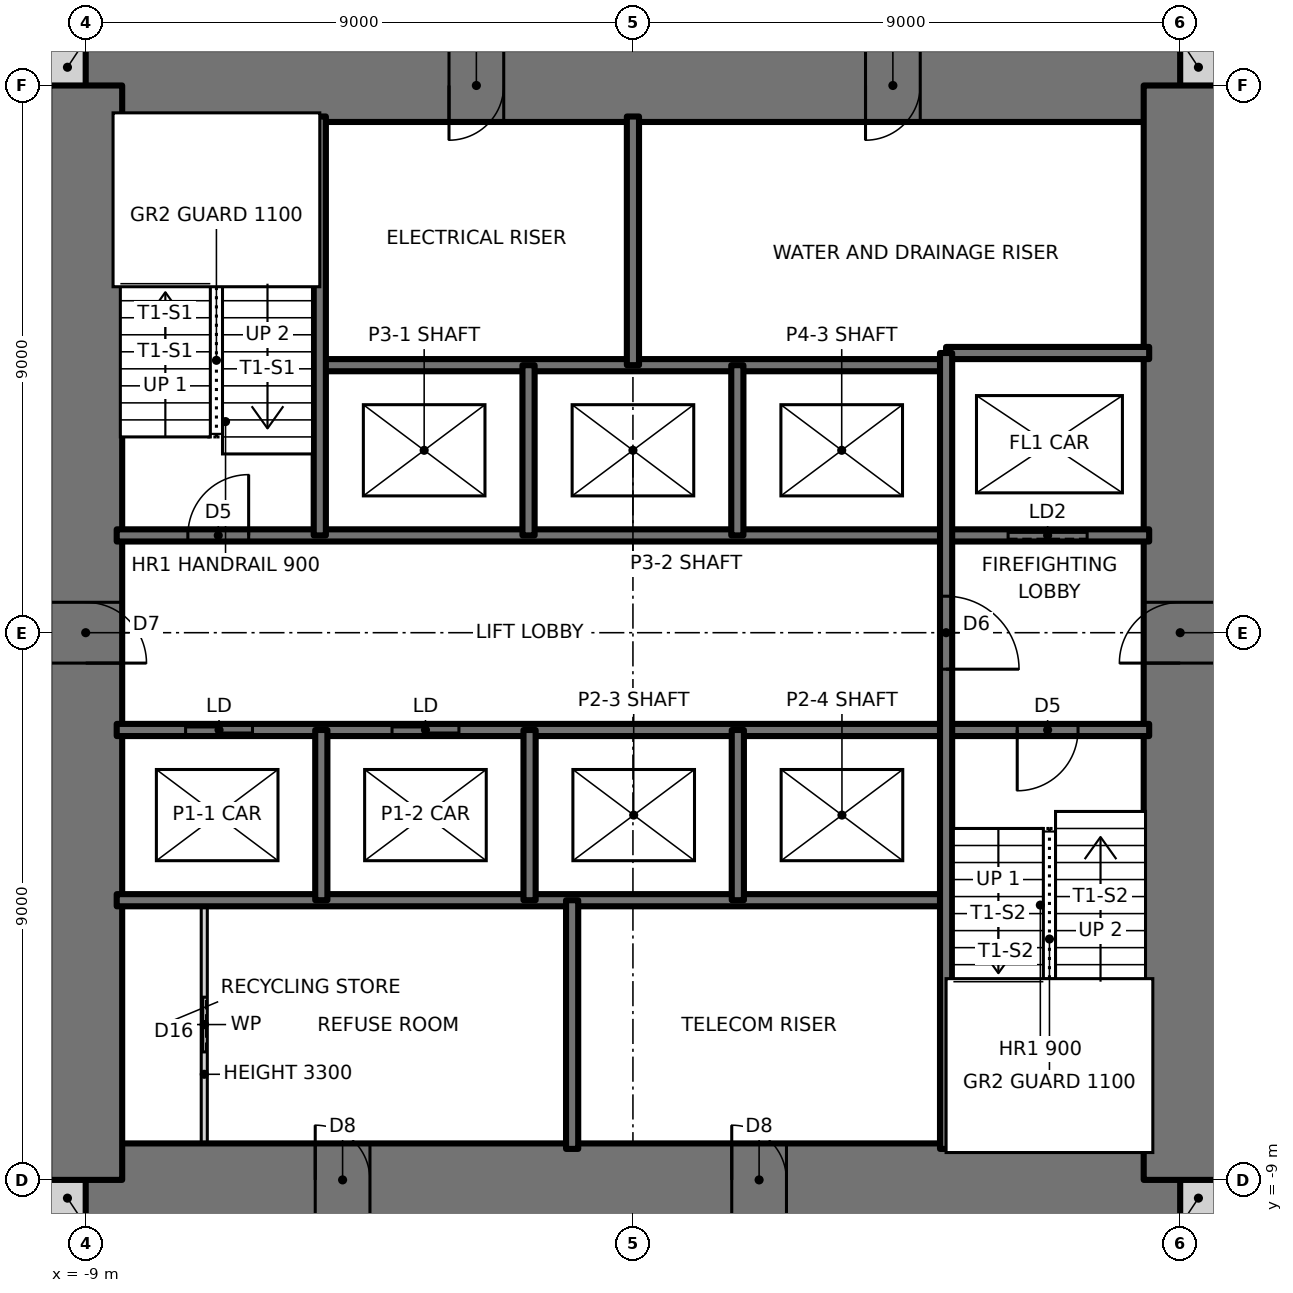
"""IFC4 building model, lengths in metres.
Left out: names, types, materials, properties, quantities, classifications, styles, units other than length and angle.
Written with IfcOpenShell. Run it as: python <this file> out.ifc"""

import sys

from ifc_helpers import new_model, si_unit, direction, frame, frame_2d, origin, place, context, subcontext, project, spatial, rectangle, extrude, element, fill, save


model = new_model("IFC4")
c1 = context("Model", 3, precision=1e-05, world=origin(), true_north=direction((0.0, 1.0)))
c2 = subcontext(c1, "Body", "Model", "MODEL_VIEW")
j1 = project(units=[si_unit("LENGTHUNIT", "METRE"), si_unit("PLANEANGLEUNIT", "RADIAN")], contexts=[c1])
p1 = place(None, origin())
s1 = spatial("IfcSite", under=j1, at=p1, CompositionType="ELEMENT")
p2 = place(p1, origin())
s2 = spatial("IfcBuilding", under=s1, at=p2, CompositionType="ELEMENT")
p3 = place(p2, frame((0.0, 0.0, 39.5)))
s3 = spatial("IfcBuildingStorey", under=s2, at=p3, CompositionType="ELEMENT", Elevation=39.5)
for number, where, z_axis, x_axis in (
    (1, (-9.6, -9.3, 0.0), (0.0, 0.0, 1.0), (1.0, 0.0, 0.0)),
    (2, (9.0, -9.3, 0.0), (0.0, 0.0, 1.0), (1.0, 0.0, 0.0)),
    (3, (9.0, 9.3, 0.0), (0.0, 0.0, 1.0), (1.0, 0.0, 0.0)),
    (4, (-9.6, 9.3, 0.0), (0.0, 0.0, 1.0), (1.0, 0.0, 0.0)),
):
    element("IfcWall", number, at=place(p3, frame(where, z_axis=z_axis, x_axis=x_axis)), inside=s3, PredefinedType="SOLIDWALL", context=c2, shape_type="SweptSolid", body=[
        extrude(rectangle(XDim=0.6, YDim=0.6, at=frame_2d((0.3, 0.0))), origin(), (0.0, 0.0, 1.0), 3.5),
    ])
p4 = place(p3, frame((-9.0, -9.0, 0.0), z_axis=(0.0, 0.0, 1.0), x_axis=(1.0, 0.0, 0.0)))
e5 = element("IfcWall", 5, at=p4, inside=s3, PredefinedType="SHEAR", context=c2, shape_type="SweptSolid", body=[
    extrude(rectangle(XDim=18.0, YDim=1.2, at=frame_2d((9.0, 0.0))), origin(), (0.0, 0.0, 1.0), 3.5),
])
p5 = place(p4, frame((3.775, 0.0, 0.0)))
e6 = element("IfcOpeningElement", 6, at=p5, cuts=e5, PredefinedType="OPENING", context=c2, shape_type="SweptSolid", body=[
    extrude(rectangle(XDim=0.9, YDim=2.1, at=frame_2d((0.45, 1.05))), frame((0.0, 0.61, 0.0), z_axis=(0.0, -1.0, 0.0), x_axis=(1.0, 0.0, 0.0)), (0.0, 0.0, 1.0), 1.22),
])
p6 = place(p4, frame((10.625, 0.0, 0.0)))
e7 = element("IfcOpeningElement", 7, at=p6, cuts=e5, PredefinedType="OPENING", context=c2, shape_type="SweptSolid", body=[
    extrude(rectangle(XDim=0.9, YDim=2.1, at=frame_2d((0.45, 1.05))), frame((0.0, 0.61, 0.0), z_axis=(0.0, -1.0, 0.0), x_axis=(1.0, 0.0, 0.0)), (0.0, 0.0, 1.0), 1.22),
])
p7 = place(p3, frame((9.0, 9.0, 0.0), z_axis=(0.0, 0.0, 1.0), x_axis=(-1.0, 0.0, 0.0)))
e8 = element("IfcWall", 8, at=p7, inside=s3, PredefinedType="SHEAR", context=c2, shape_type="SweptSolid", body=[
    extrude(rectangle(XDim=18.0, YDim=1.2, at=frame_2d((9.0, 0.0))), origin(), (0.0, 0.0, 1.0), 3.5),
])
p8 = place(p7, frame((11.125, 0.0, 0.0)))
e9 = element("IfcOpeningElement", 9, at=p8, cuts=e8, PredefinedType="OPENING", context=c2, shape_type="SweptSolid", body=[
    extrude(rectangle(XDim=0.9, YDim=2.1, at=frame_2d((0.45, 1.05))), frame((0.0, 0.61, 0.0), z_axis=(0.0, -1.0, 0.0), x_axis=(1.0, 0.0, 0.0)), (0.0, 0.0, 1.0), 1.22),
])
p9 = place(p7, frame((4.275, 0.0, 0.0)))
e10 = element("IfcOpeningElement", 10, at=p9, cuts=e8, PredefinedType="OPENING", context=c2, shape_type="SweptSolid", body=[
    extrude(rectangle(XDim=0.9, YDim=2.1, at=frame_2d((0.45, 1.05))), frame((0.0, 0.61, 0.0), z_axis=(0.0, -1.0, 0.0), x_axis=(1.0, 0.0, 0.0)), (0.0, 0.0, 1.0), 1.22),
])
p10 = place(p3, frame((9.0, -9.0, 0.0), z_axis=(0.0, 0.0, 1.0), x_axis=(0.0, 1.0, 0.0)))
e11 = element("IfcWall", 11, at=p10, inside=s3, PredefinedType="SHEAR", context=c2, shape_type="SweptSolid", body=[
    extrude(rectangle(XDim=18.0, YDim=1.2, at=frame_2d((9.0, 0.0))), origin(), (0.0, 0.0, 1.0), 3.5),
])
p11 = place(p10, frame((8.5, 0.0, 0.0)))
e12 = element("IfcOpeningElement", 12, at=p11, cuts=e11, PredefinedType="OPENING", context=c2, shape_type="SweptSolid", body=[
    extrude(rectangle(XDim=1.0, YDim=2.1, at=frame_2d((0.5, 1.05))), frame((0.0, 0.61, 0.0), z_axis=(0.0, -1.0, 0.0), x_axis=(1.0, 0.0, 0.0)), (0.0, 0.0, 1.0), 1.22),
])
p12 = place(p3, frame((-9.0, 9.0, 0.0), z_axis=(0.0, 0.0, 1.0), x_axis=(0.0, -1.0, 0.0)))
e13 = element("IfcWall", 13, at=p12, inside=s3, PredefinedType="SHEAR", context=c2, shape_type="SweptSolid", body=[
    extrude(rectangle(XDim=18.0, YDim=1.2, at=frame_2d((9.0, 0.0))), origin(), (0.0, 0.0, 1.0), 3.5),
])
p13 = place(p12, frame((8.5, 0.0, 0.0)))
e14 = element("IfcOpeningElement", 14, at=p13, cuts=e13, PredefinedType="OPENING", context=c2, shape_type="SweptSolid", body=[
    extrude(rectangle(XDim=1.0, YDim=2.1, at=frame_2d((0.5, 1.05))), frame((0.0, 0.61, 0.0), z_axis=(0.0, -1.0, 0.0), x_axis=(1.0, 0.0, 0.0)), (0.0, 0.0, 1.0), 1.22),
])
p14 = place(p3, frame((-8.49, -4.4, 0.0), z_axis=(0.0, 0.0, 1.0), x_axis=(1.0, 0.0, 0.0)))
e15 = element("IfcWall", 15, at=p14, inside=s3, PredefinedType="SOLIDWALL", context=c2, shape_type="SweptSolid", body=[
    extrude(rectangle(XDim=13.64, YDim=0.2, at=frame_2d((6.82, 0.0))), origin(), (0.0, 0.0, 1.0), 3.5),
])
p15 = place(p3, frame((-8.49, -1.6, 0.0), z_axis=(0.0, 0.0, 1.0), x_axis=(1.0, 0.0, 0.0)))
e16 = element("IfcWall", 16, at=p15, inside=s3, PredefinedType="SOLIDWALL", context=c2, shape_type="SweptSolid", body=[
    extrude(rectangle(XDim=16.98, YDim=0.2, at=frame_2d((8.49, 0.0))), origin(), (0.0, 0.0, 1.0), 3.5),
])
p16 = place(p15, frame((14.81, 0.0, 0.0)))
e17 = element("IfcOpeningElement", 17, at=p16, cuts=e16, PredefinedType="OPENING", context=c2, shape_type="SweptSolid", body=[
    extrude(rectangle(XDim=1.0, YDim=2.1, at=frame_2d((0.5, 1.05))), frame((0.0, 0.11, 0.0), z_axis=(0.0, -1.0, 0.0), x_axis=(1.0, 0.0, 0.0)), (0.0, 0.0, 1.0), 0.22),
])
p17 = place(p15, frame((1.133, 0.0, 0.0)))
e18 = element("IfcOpeningElement", 18, at=p17, cuts=e16, PredefinedType="OPENING", context=c2, shape_type="SweptSolid", body=[
    extrude(rectangle(XDim=1.1, YDim=2.1, at=frame_2d((0.55, 1.05))), frame((0.0, 0.11, 0.0), z_axis=(0.0, -1.0, 0.0), x_axis=(1.0, 0.0, 0.0)), (0.0, 0.0, 1.0), 0.22),
])
p18 = place(p15, frame((4.528, 0.0, 0.0)))
e19 = element("IfcOpeningElement", 19, at=p18, cuts=e16, PredefinedType="OPENING", context=c2, shape_type="SweptSolid", body=[
    extrude(rectangle(XDim=1.1, YDim=2.1, at=frame_2d((0.55, 1.05))), frame((0.0, 0.11, 0.0), z_axis=(0.0, -1.0, 0.0), x_axis=(1.0, 0.0, 0.0)), (0.0, 0.0, 1.0), 0.22),
])
p19 = place(p3, frame((-8.49, 1.6, 0.0), z_axis=(0.0, 0.0, 1.0), x_axis=(1.0, 0.0, 0.0)))
e20 = element("IfcWall", 20, at=p19, inside=s3, PredefinedType="SOLIDWALL", context=c2, shape_type="SweptSolid", body=[
    extrude(rectangle(XDim=16.98, YDim=0.2, at=frame_2d((8.49, 0.0))), origin(), (0.0, 0.0, 1.0), 3.5),
])
p20 = place(p19, frame((1.17, 0.0, 0.0)))
e21 = element("IfcOpeningElement", 21, at=p20, cuts=e20, PredefinedType="OPENING", context=c2, shape_type="SweptSolid", body=[
    extrude(rectangle(XDim=1.0, YDim=2.1, at=frame_2d((0.5, 1.05))), frame((0.0, 0.11, 0.0), z_axis=(0.0, -1.0, 0.0), x_axis=(1.0, 0.0, 0.0)), (0.0, 0.0, 1.0), 0.22),
])
p21 = place(p19, frame((14.66, 0.0, 0.0)))
e22 = element("IfcOpeningElement", 22, at=p21, cuts=e20, PredefinedType="OPENING", context=c2, shape_type="SweptSolid", body=[
    extrude(rectangle(XDim=1.3, YDim=2.1, at=frame_2d((0.65, 1.05))), frame((0.0, 0.11, 0.0), z_axis=(0.0, -1.0, 0.0), x_axis=(1.0, 0.0, 0.0)), (0.0, 0.0, 1.0), 0.22),
])
p22 = place(p3, frame((-5.15, 4.4, 0.0), z_axis=(0.0, 0.0, 1.0), x_axis=(1.0, 0.0, 0.0)))
e23 = element("IfcWall", 23, at=p22, inside=s3, PredefinedType="SOLIDWALL", context=c2, shape_type="SweptSolid", body=[
    extrude(rectangle(XDim=10.3, YDim=0.2, at=frame_2d((5.15, 0.0))), origin(), (0.0, 0.0, 1.0), 3.5),
])
p23 = place(p3, frame((5.15, 4.6, 0.0), z_axis=(0.0, 0.0, 1.0), x_axis=(1.0, 0.0, 0.0)))
e24 = element("IfcWall", 24, at=p23, inside=s3, PredefinedType="SOLIDWALL", context=c2, shape_type="SweptSolid", body=[
    extrude(rectangle(XDim=3.34, YDim=0.2, at=frame_2d((1.67, 0.0))), origin(), (0.0, 0.0, 1.0), 3.5),
])
p24 = place(p3, frame((5.15, -8.49, 0.0), z_axis=(0.0, 0.0, 1.0), x_axis=(0.0, 1.0, 0.0)))
e25 = element("IfcWall", 25, at=p24, inside=s3, PredefinedType="SOLIDWALL", context=c2, shape_type="SweptSolid", body=[
    extrude(rectangle(XDim=13.09, YDim=0.2, at=frame_2d((6.545, 0.0))), origin(), (0.0, 0.0, 1.0), 3.5),
])
p25 = place(p24, frame((7.89, 0.0, 0.0)))
e26 = element("IfcOpeningElement", 26, at=p25, cuts=e25, PredefinedType="OPENING", context=c2, shape_type="SweptSolid", body=[
    extrude(rectangle(XDim=1.2, YDim=2.1, at=frame_2d((0.6, 1.05))), frame((0.0, 0.11, 0.0), z_axis=(0.0, -1.0, 0.0), x_axis=(1.0, 0.0, 0.0)), (0.0, 0.0, 1.0), 0.22),
])
for number, where, z_axis, x_axis in (
    (27, (1.725, -4.4, 0.0), (0.0, 0.0, 1.0), (0.0, 1.0, 0.0)),
    (28, (1.717, 1.6, 0.0), (0.0, 0.0, 1.0), (0.0, 1.0, 0.0)),
):
    element("IfcWall", number, at=place(p3, frame(where, z_axis=z_axis, x_axis=x_axis)), inside=s3, PredefinedType="SOLIDWALL", context=c2, shape_type="SweptSolid", body=[
        extrude(rectangle(XDim=2.8, YDim=0.2, at=frame_2d((1.4, 0.0))), origin(), (0.0, 0.0, 1.0), 3.5),
    ])
for number, where, z_axis, x_axis in (
    (29, (0.0, 4.4, 0.0), (0.0, 0.0, 1.0), (0.0, 1.0, 0.0)),
    (30, (-1.0, -8.49, 0.0), (0.0, 0.0, 1.0), (0.0, 1.0, 0.0)),
):
    element("IfcWall", number, at=place(p3, frame(where, z_axis=z_axis, x_axis=x_axis)), inside=s3, PredefinedType="SOLIDWALL", context=c2, shape_type="SweptSolid", body=[
        extrude(rectangle(XDim=4.09, YDim=0.2, at=frame_2d((2.045, 0.0))), origin(), (0.0, 0.0, 1.0), 3.5),
    ])
for number, where, z_axis, x_axis in (
    (31, (-1.7, -4.4, 0.0), (0.0, 0.0, 1.0), (0.0, 1.0, 0.0)),
    (32, (-1.717, 1.6, 0.0), (0.0, 0.0, 1.0), (0.0, 1.0, 0.0)),
    (33, (-5.125, -4.4, 0.0), (0.0, 0.0, 1.0), (0.0, 1.0, 0.0)),
):
    element("IfcWall", number, at=place(p3, frame(where, z_axis=z_axis, x_axis=x_axis)), inside=s3, PredefinedType="SOLIDWALL", context=c2, shape_type="SweptSolid", body=[
        extrude(rectangle(XDim=2.8, YDim=0.2, at=frame_2d((1.4, 0.0))), origin(), (0.0, 0.0, 1.0), 3.5),
    ])
p26 = place(p3, frame((-5.15, 1.6, 0.0), z_axis=(0.0, 0.0, 1.0), x_axis=(0.0, 1.0, 0.0)))
e34 = element("IfcWall", 34, at=p26, inside=s3, PredefinedType="SOLIDWALL", context=c2, shape_type="SweptSolid", body=[
    extrude(rectangle(XDim=6.89, YDim=0.2, at=frame_2d((3.445, 0.0))), origin(), (0.0, 0.0, 1.0), 3.5),
])
p27 = place(p3, frame((-7.05, -8.49, 0.0), z_axis=(0.0, 0.0, 1.0), x_axis=(0.0, 1.0, 0.0)))
e35 = element("IfcWall", 35, at=p27, inside=s3, PredefinedType="PARTITIONING", context=c2, shape_type="SweptSolid", body=[
    extrude(rectangle(XDim=4.09, YDim=0.1, at=frame_2d((2.045, 0.0))), origin(), (0.0, 0.0, 1.0), 3.3),
])
p28 = place(p27, frame((1.595, 0.0, 0.0)))
e36 = element("IfcOpeningElement", 36, at=p28, cuts=e35, PredefinedType="OPENING", context=c2, shape_type="SweptSolid", body=[
    extrude(rectangle(XDim=0.9, YDim=2.1, at=frame_2d((0.45, 1.05))), frame((0.0, 0.06, 0.0), z_axis=(0.0, -1.0, 0.0), x_axis=(1.0, 0.0, 0.0)), (0.0, 0.0, 1.0), 0.12),
])
p29 = place(p20, origin())
e37 = element("IfcDoor", 37, at=p29, inside=s3, OperationType="SINGLE_SWING_RIGHT", PredefinedType="DOOR", context=c2, shape_type="SweptSolid", body=[
    extrude(rectangle(XDim=1.0, YDim=2.1, at=frame_2d((0.5, 1.05))), frame((0.0, 0.025, 0.0), z_axis=(0.0, -1.0, 0.0), x_axis=(1.0, 0.0, 0.0)), (0.0, 0.0, 1.0), 0.05),
])
fill(e21, e37)
p30 = place(p16, frame((1.0, 0.0, 0.0), z_axis=(0.0, 0.0, 1.0), x_axis=(-1.0, 0.0, 0.0)))
e38 = element("IfcDoor", 38, at=p30, inside=s3, OperationType="SINGLE_SWING_RIGHT", PredefinedType="DOOR", context=c2, shape_type="SweptSolid", body=[
    extrude(rectangle(XDim=1.0, YDim=2.1, at=frame_2d((0.5, 1.05))), frame((0.0, 0.025, 0.0), z_axis=(0.0, -1.0, 0.0), x_axis=(1.0, 0.0, 0.0)), (0.0, 0.0, 1.0), 0.05),
])
fill(e17, e38)
p31 = place(p25, frame((1.2, 0.0, 0.0), z_axis=(0.0, 0.0, 1.0), x_axis=(-1.0, 0.0, 0.0)))
e39 = element("IfcDoor", 39, at=p31, inside=s3, OperationType="SINGLE_SWING_RIGHT", PredefinedType="DOOR", context=c2, shape_type="SweptSolid", body=[
    extrude(rectangle(XDim=1.2, YDim=2.1, at=frame_2d((0.6, 1.05))), frame((0.0, 0.025, 0.0), z_axis=(0.0, -1.0, 0.0), x_axis=(1.0, 0.0, 0.0)), (0.0, 0.0, 1.0), 0.05),
])
fill(e26, e39)
p32 = place(p28, origin())
e40 = element("IfcDoor", 40, at=p32, inside=s3, OperationType="SLIDING_TO_LEFT", PredefinedType="DOOR", context=c2, shape_type="SweptSolid", body=[
    extrude(rectangle(XDim=0.9, YDim=2.1, at=frame_2d((0.45, 1.05))), frame((0.0, 0.025, 0.0), z_axis=(0.0, -1.0, 0.0), x_axis=(1.0, 0.0, 0.0)), (0.0, 0.0, 1.0), 0.05),
])
fill(e36, e40)
p33 = place(p13, origin())
e41 = element("IfcDoor", 41, at=p33, inside=s3, OperationType="SINGLE_SWING_RIGHT", PredefinedType="DOOR", context=c2, shape_type="SweptSolid", body=[
    extrude(rectangle(XDim=1.0, YDim=2.1, at=frame_2d((0.5, 1.05))), frame((0.0, 0.025, 0.0), z_axis=(0.0, -1.0, 0.0), x_axis=(1.0, 0.0, 0.0)), (0.0, 0.0, 1.0), 0.05),
])
fill(e14, e41)
p34 = place(p11, origin())
e42 = element("IfcDoor", 42, at=p34, inside=s3, OperationType="SINGLE_SWING_LEFT", PredefinedType="DOOR", context=c2, shape_type="SweptSolid", body=[
    extrude(rectangle(XDim=1.0, YDim=2.1, at=frame_2d((0.5, 1.05))), frame((0.0, 0.025, 0.0), z_axis=(0.0, -1.0, 0.0), x_axis=(1.0, 0.0, 0.0)), (0.0, 0.0, 1.0), 0.05),
])
fill(e12, e42)
p35 = place(p8, origin())
e43 = element("IfcDoor", 43, at=p35, inside=s3, OperationType="SINGLE_SWING_RIGHT", PredefinedType="DOOR", context=c2, shape_type="SweptSolid", body=[
    extrude(rectangle(XDim=0.9, YDim=2.1, at=frame_2d((0.45, 1.05))), frame((0.0, 0.025, 0.0), z_axis=(0.0, -1.0, 0.0), x_axis=(1.0, 0.0, 0.0)), (0.0, 0.0, 1.0), 0.05),
])
fill(e9, e43)
p36 = place(p9, origin())
e44 = element("IfcDoor", 44, at=p36, inside=s3, OperationType="SINGLE_SWING_RIGHT", PredefinedType="DOOR", context=c2, shape_type="SweptSolid", body=[
    extrude(rectangle(XDim=0.9, YDim=2.1, at=frame_2d((0.45, 1.05))), frame((0.0, 0.025, 0.0), z_axis=(0.0, -1.0, 0.0), x_axis=(1.0, 0.0, 0.0)), (0.0, 0.0, 1.0), 0.05),
])
fill(e10, e44)
p37 = place(p5, origin())
e45 = element("IfcDoor", 45, at=p37, inside=s3, OperationType="SINGLE_SWING_LEFT", PredefinedType="DOOR", context=c2, shape_type="SweptSolid", body=[
    extrude(rectangle(XDim=0.9, YDim=2.1, at=frame_2d((0.45, 1.05))), frame((0.0, 0.025, 0.0), z_axis=(0.0, -1.0, 0.0), x_axis=(1.0, 0.0, 0.0)), (0.0, 0.0, 1.0), 0.05),
])
fill(e6, e45)
p38 = place(p6, origin())
e46 = element("IfcDoor", 46, at=p38, inside=s3, OperationType="SINGLE_SWING_LEFT", PredefinedType="DOOR", context=c2, shape_type="SweptSolid", body=[
    extrude(rectangle(XDim=0.9, YDim=2.1, at=frame_2d((0.45, 1.05))), frame((0.0, 0.025, 0.0), z_axis=(0.0, -1.0, 0.0), x_axis=(1.0, 0.0, 0.0)), (0.0, 0.0, 1.0), 0.05),
])
fill(e7, e46)
p39 = place(p17, origin())
e47 = element("IfcDoor", 47, at=p39, inside=s3, OperationType="DOUBLE_DOOR_SLIDING", PredefinedType="DOOR", context=c2, shape_type="SweptSolid", body=[
    extrude(rectangle(XDim=1.1, YDim=2.1, at=frame_2d((0.55, 1.05))), frame((0.0, 0.025, 0.0), z_axis=(0.0, -1.0, 0.0), x_axis=(1.0, 0.0, 0.0)), (0.0, 0.0, 1.0), 0.05),
])
fill(e18, e47)
p40 = place(p18, origin())
e48 = element("IfcDoor", 48, at=p40, inside=s3, OperationType="DOUBLE_DOOR_SLIDING", PredefinedType="DOOR", context=c2, shape_type="SweptSolid", body=[
    extrude(rectangle(XDim=1.1, YDim=2.1, at=frame_2d((0.55, 1.05))), frame((0.0, 0.025, 0.0), z_axis=(0.0, -1.0, 0.0), x_axis=(1.0, 0.0, 0.0)), (0.0, 0.0, 1.0), 0.05),
])
fill(e19, e48)
p41 = place(p21, origin())
e49 = element("IfcDoor", 49, at=p41, inside=s3, OperationType="SLIDING_TO_LEFT", PredefinedType="DOOR", context=c2, shape_type="SweptSolid", body=[
    extrude(rectangle(XDim=1.3, YDim=2.1, at=frame_2d((0.65, 1.05))), frame((0.0, 0.025, 0.0), z_axis=(0.0, -1.0, 0.0), x_axis=(1.0, 0.0, 0.0)), (0.0, 0.0, 1.0), 0.05),
])
fill(e22, e49)
save(model, sys.argv[1])
